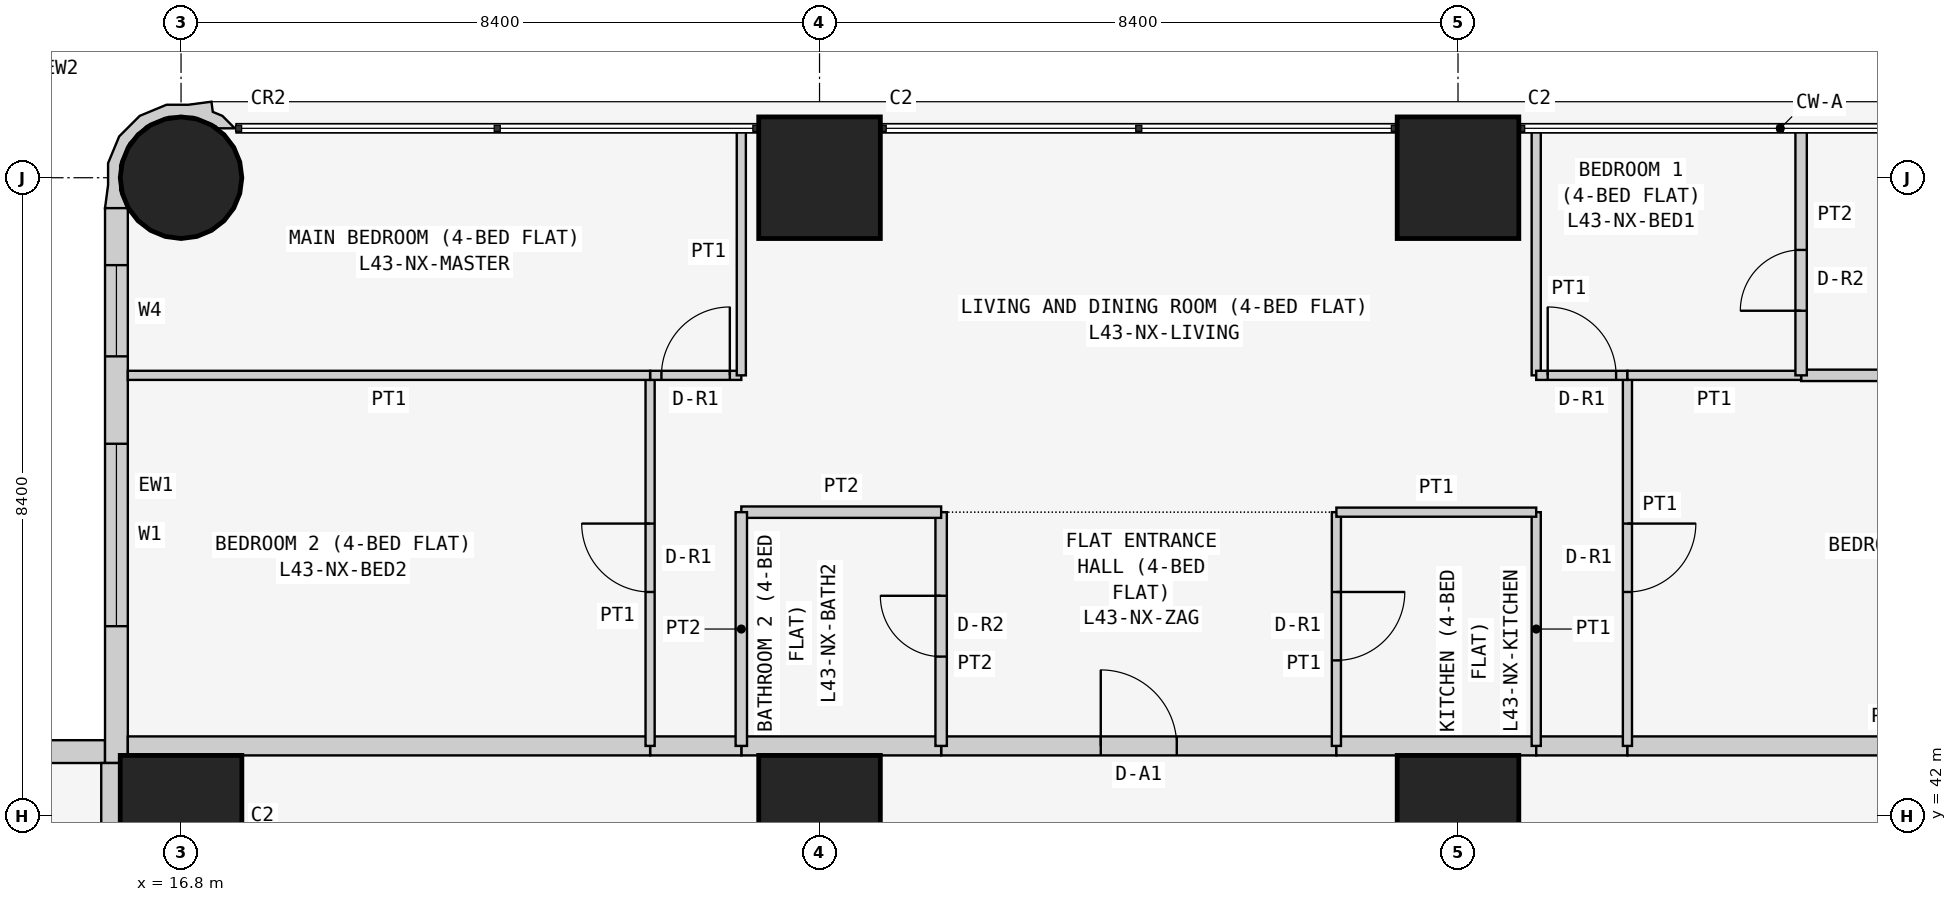
"""IFC4 building model, lengths in metres.
Left out: names, types, materials, properties, quantities, classifications, styles, units other than length and angle.
Written with IfcOpenShell. Run it as: python <this file> out.ifc"""

import sys

from ifc_helpers import new_model, si_unit, direction, frame, frame_2d, origin, origin_2d, place, context, subcontext, project, spatial, polyline, rectangle, circle, outline, extrude, element, fill, save


model = new_model("IFC4")
c1 = context("Model", 3, precision=1e-05, world=origin(), true_north=direction((0.0, 1.0)))
c2 = subcontext(c1, "Body", "Model", "MODEL_VIEW")
j1 = project(units=[si_unit("LENGTHUNIT", "METRE"), si_unit("PLANEANGLEUNIT", "RADIAN")], contexts=[c1])
p1 = place(None, origin())
s1 = spatial("IfcSite", under=j1, at=p1, CompositionType="ELEMENT")
p2 = place(p1, origin())
s2 = spatial("IfcBuilding", under=s1, at=p2, CompositionType="ELEMENT")
p3 = place(p2, frame((0.0, 0.0, 166.5)))
s3 = spatial("IfcBuildingStorey", under=s2, at=p3, CompositionType="ELEMENT", Elevation=166.5)
p4 = place(p3, frame((16.8, 42.0, 0.0), z_axis=(0.0, 0.0, 1.0), x_axis=(1.0, 0.0, 0.0)))
e1 = element("IfcColumn", 1, at=p4, inside=s3, PredefinedType="COLUMN", context=c2, shape_type="SweptSolid", body=[
    extrude(rectangle(XDim=1.6, YDim=1.6, at=origin_2d()), origin(), (0.0, 0.0, 1.0), 3.6),
])
p5 = place(p3, frame((16.8, 50.4, 0.0), z_axis=(0.0, 0.0, 1.0), x_axis=(1.0, 0.0, 0.0)))
e2 = element("IfcColumn", 2, at=p5, inside=s3, PredefinedType="COLUMN", context=c2, shape_type="SweptSolid", body=[
    extrude(circle(Radius=0.8, at=origin_2d()), origin(), (0.0, 0.0, 1.0), 3.6),
])
for number, where, z_axis, x_axis in (
    (3, (25.2, 42.0, 0.0), (0.0, 0.0, 1.0), (1.0, 0.0, 0.0)),
    (4, (25.2, 50.4, 0.0), (0.0, 0.0, 1.0), (1.0, 0.0, 0.0)),
    (5, (33.6, 42.0, 0.0), (0.0, 0.0, 1.0), (1.0, 0.0, 0.0)),
    (6, (33.6, 50.4, 0.0), (0.0, 0.0, 1.0), (1.0, 0.0, 0.0)),
):
    element("IfcColumn", number, at=place(p3, frame(where, z_axis=z_axis, x_axis=x_axis)), inside=s3, PredefinedType="COLUMN", context=c2, shape_type="SweptSolid", body=[
        extrude(rectangle(XDim=1.6, YDim=1.6, at=origin_2d()), origin(), (0.0, 0.0, 1.0), 3.6),
    ])
p6 = place(p3, frame((15.8, 42.85, 0.0), z_axis=(0.0, 0.0, 1.0), x_axis=(-1.0, 0.0, 0.0)))
e7 = element("IfcWall", 7, at=p6, inside=s3, PredefinedType="SOLIDWALL", context=c2, shape_type="SweptSolid", body=[
    extrude(rectangle(XDim=15.4, YDim=0.3, at=frame_2d((7.7, 0.0))), origin(), (0.0, 0.0, 1.0), 3.45),
])
p7 = place(p6, frame((1.2, 0.0, 0.9)))
e8 = element("IfcOpeningElement", 8, at=p7, cuts=e7, PredefinedType="OPENING", context=c2, shape_type="SweptSolid", body=[
    extrude(rectangle(XDim=1.8, YDim=1.5, at=frame_2d((0.9, 0.75))), frame((0.0, 0.16, 0.0), z_axis=(0.0, -1.0, 0.0), x_axis=(1.0, 0.0, 0.0)), (0.0, 0.0, 1.0), 0.32),
])
p8 = place(p6, frame((4.95, 0.0, 1.5)))
e9 = element("IfcOpeningElement", 9, at=p8, cuts=e7, PredefinedType="OPENING", context=c2, shape_type="SweptSolid", body=[
    extrude(rectangle(XDim=0.9, YDim=0.7, at=frame_2d((0.45, 0.35))), frame((0.0, 0.16, 0.0), z_axis=(0.0, -1.0, 0.0), x_axis=(1.0, 0.0, 0.0)), (0.0, 0.0, 1.0), 0.32),
])
p9 = place(p6, frame((8.5, 0.0, 0.9)))
e10 = element("IfcOpeningElement", 10, at=p9, cuts=e7, PredefinedType="OPENING", context=c2, shape_type="SweptSolid", body=[
    extrude(rectangle(XDim=1.8, YDim=1.5, at=frame_2d((0.9, 0.75))), frame((0.0, 0.16, 0.0), z_axis=(0.0, -1.0, 0.0), x_axis=(1.0, 0.0, 0.0)), (0.0, 0.0, 1.0), 0.32),
])
p10 = place(p6, frame((12.5, 0.0, 0.0)))
e11 = element("IfcOpeningElement", 11, at=p10, cuts=e7, PredefinedType="OPENING", context=c2, shape_type="SweptSolid", body=[
    extrude(rectangle(XDim=0.9, YDim=2.4, at=frame_2d((0.45, 1.2))), frame((0.0, 0.16, 0.0), z_axis=(0.0, -1.0, 0.0), x_axis=(1.0, 0.0, 0.0)), (0.0, 0.0, 1.0), 0.32),
])
p11 = place(p6, frame((13.5, 0.0, 0.9)))
e12 = element("IfcOpeningElement", 12, at=p11, cuts=e7, PredefinedType="OPENING", context=c2, shape_type="SweptSolid", body=[
    extrude(rectangle(XDim=1.2, YDim=1.5, at=frame_2d((0.6, 0.75))), frame((0.0, 0.16, 0.0), z_axis=(0.0, -1.0, 0.0), x_axis=(1.0, 0.0, 0.0)), (0.0, 0.0, 1.0), 0.32),
])
p12 = place(p3, frame((15.95, 50.0, 0.0), z_axis=(0.0, 0.0, 1.0), x_axis=(0.0, -1.0, 0.0)))
e13 = element("IfcWall", 13, at=p12, inside=s3, PredefinedType="SOLIDWALL", context=c2, shape_type="SweptSolid", body=[
    extrude(rectangle(XDim=7.3, YDim=0.3, at=frame_2d((3.65, 0.0))), origin(), (0.0, 0.0, 1.0), 3.45),
])
p13 = place(p12, frame((3.1, 0.0, 0.9)))
e14 = element("IfcOpeningElement", 14, at=p13, cuts=e13, PredefinedType="OPENING", context=c2, shape_type="SweptSolid", body=[
    extrude(rectangle(XDim=2.4, YDim=1.5, at=frame_2d((1.2, 0.75))), frame((0.0, 0.16, 0.0), z_axis=(0.0, -1.0, 0.0), x_axis=(1.0, 0.0, 0.0)), (0.0, 0.0, 1.0), 0.32),
])
p14 = place(p12, frame((0.75, 0.0, 0.9)))
e15 = element("IfcOpeningElement", 15, at=p14, cuts=e13, PredefinedType="OPENING", context=c2, shape_type="SweptSolid", body=[
    extrude(rectangle(XDim=1.2, YDim=1.5, at=frame_2d((0.6, 0.75))), frame((0.0, 0.16, 0.0), z_axis=(0.0, -1.0, 0.0), x_axis=(1.0, 0.0, 0.0)), (0.0, 0.0, 1.0), 0.32),
])
p15 = place(p3, frame((17.448, 50.995, 0.0), z_axis=(0.0, 0.0, 1.0), x_axis=(-0.343276641956, 0.93923434088, 0.0)))
e16 = element("IfcWall", 16, at=p15, inside=s3, PredefinedType="SOLIDWALL", context=c2, shape_type="SweptSolid", body=[
    extrude(outline(polyline([(0.241, 0.023), (0.333, 0.124), (0.465, 0.094), (0.532, 0.393), (0.631, 0.663), (0.614, 1.045), (0.454, 1.391), (0.172, 1.649), (-0.098, 1.748), (-0.369, 1.89), (-0.509, 1.621), (-0.491, 1.615), (-0.479, 1.609), (-0.211, 1.62), (0.088, 1.511), (0.323, 1.295), (0.457, 1.006), (0.47, 0.688), (0.361, 0.389), (0.145, 0.154), (0.108, 0.137), (0.031, -0.075), (0.241, 0.023)])), origin(), (0.0, 0.0, 1.0), 3.45),
])
p16 = place(p3, frame((26.8, 42.925, 0.0), z_axis=(0.0, 0.0, 1.0), x_axis=(1.0, 0.0, 0.0)))
e17 = element("IfcWall", 17, at=p16, inside=s3, PredefinedType="PARTITIONING", context=c2, shape_type="SweptSolid", body=[
    extrude(rectangle(XDim=5.2, YDim=0.25, at=frame_2d((2.6, 0.0))), origin(), (0.0, 0.0, 1.0), 3.45),
])
p17 = place(p16, frame((2.1, 0.0, 0.0)))
e18 = element("IfcOpeningElement", 18, at=p17, cuts=e17, PredefinedType="OPENING", context=c2, shape_type="SweptSolid", body=[
    extrude(rectangle(XDim=1.0, YDim=2.1, at=frame_2d((0.5, 1.05))), frame((0.0, 0.135, 0.0), z_axis=(0.0, -1.0, 0.0), x_axis=(1.0, 0.0, 0.0)), (0.0, 0.0, 1.0), 0.27),
])
p18 = place(p3, frame((24.171, 42.925, 0.0), z_axis=(0.0, 0.0, 1.0), x_axis=(1.0, 0.0, 0.0)))
e19 = element("IfcWall", 19, at=p18, inside=s3, PredefinedType="PARTITIONING", context=c2, shape_type="SweptSolid", body=[
    extrude(rectangle(XDim=2.629, YDim=0.25, at=frame_2d((1.314, 0.0))), origin(), (0.0, 0.0, 1.0), 3.45),
])
p19 = place(p3, frame((32.0, 42.925, 0.0), z_axis=(0.0, 0.0, 1.0), x_axis=(1.0, 0.0, 0.0)))
e20 = element("IfcWall", 20, at=p19, inside=s3, PredefinedType="PARTITIONING", context=c2, shape_type="SweptSolid", body=[
    extrude(rectangle(XDim=2.629, YDim=0.25, at=frame_2d((1.314, 0.0))), origin(), (0.0, 0.0, 1.0), 3.45),
])
p20 = place(p3, frame((22.971, 42.925, 0.0), z_axis=(0.0, 0.0, 1.0), x_axis=(1.0, 0.0, 0.0)))
e21 = element("IfcWall", 21, at=p20, inside=s3, PredefinedType="PARTITIONING", context=c2, shape_type="SweptSolid", body=[
    extrude(rectangle(XDim=1.2, YDim=0.25, at=frame_2d((0.6, 0.0))), origin(), (0.0, 0.0, 1.0), 3.45),
])
p21 = place(p3, frame((34.629, 42.925, 0.0), z_axis=(0.0, 0.0, 1.0), x_axis=(1.0, 0.0, 0.0)))
e22 = element("IfcWall", 22, at=p21, inside=s3, PredefinedType="PARTITIONING", context=c2, shape_type="SweptSolid", body=[
    extrude(rectangle(XDim=1.2, YDim=0.25, at=frame_2d((0.6, 0.0))), origin(), (0.0, 0.0, 1.0), 3.45),
])
for number, where, z_axis, x_axis in (
    (23, (16.1, 42.925, 0.0), (0.0, 0.0, 1.0), (1.0, 0.0, 0.0)),
    (24, (35.829, 42.925, 0.0), (0.0, 0.0, 1.0), (1.0, 0.0, 0.0)),
    (25, (15.875, 35.829, 0.0), (0.0, 0.0, 1.0), (0.0, 1.0, 0.0)),
):
    element("IfcWall", number, at=place(p3, frame(where, z_axis=z_axis, x_axis=x_axis)), inside=s3, PredefinedType="PARTITIONING", context=c2, shape_type="SweptSolid", body=[
        extrude(rectangle(XDim=6.871, YDim=0.25, at=frame_2d((3.436, 0.0))), origin(), (0.0, 0.0, 1.0), 3.45),
    ])
p22 = place(p3, frame((26.8, 46.0, 0.0), z_axis=(0.0, 0.0, 1.0), x_axis=(0.0, -1.0, 0.0)))
e26 = element("IfcWall", 26, at=p22, inside=s3, PredefinedType="PARTITIONING", context=c2, shape_type="SweptSolid", body=[
    extrude(rectangle(XDim=3.075, YDim=0.15, at=frame_2d((1.538, 0.0))), origin(), (0.0, 0.0, 1.0), 3.45),
])
p23 = place(p22, frame((1.1, 0.0, 0.0)))
e27 = element("IfcOpeningElement", 27, at=p23, cuts=e26, PredefinedType="OPENING", context=c2, shape_type="SweptSolid", body=[
    extrude(rectangle(XDim=0.8, YDim=2.1, at=frame_2d((0.4, 1.05))), frame((0.0, 0.085, 0.0), z_axis=(0.0, -1.0, 0.0), x_axis=(1.0, 0.0, 0.0)), (0.0, 0.0, 1.0), 0.17),
])
p24 = place(p3, frame((32.0, 42.925, 0.0), z_axis=(0.0, 0.0, 1.0), x_axis=(0.0, 1.0, 0.0)))
e28 = element("IfcWall", 28, at=p24, inside=s3, PredefinedType="PARTITIONING", context=c2, shape_type="SweptSolid", body=[
    extrude(rectangle(XDim=3.075, YDim=0.12, at=frame_2d((1.538, 0.0))), origin(), (0.0, 0.0, 1.0), 3.45),
])
p25 = place(p24, frame((1.125, 0.0, 0.0)))
e29 = element("IfcOpeningElement", 29, at=p25, cuts=e28, PredefinedType="OPENING", context=c2, shape_type="SweptSolid", body=[
    extrude(rectangle(XDim=0.9, YDim=2.1, at=frame_2d((0.45, 1.05))), frame((0.0, 0.07, 0.0), z_axis=(0.0, -1.0, 0.0), x_axis=(1.0, 0.0, 0.0)), (0.0, 0.0, 1.0), 0.14),
])
p26 = place(p3, frame((26.8, 46.0, 0.0), z_axis=(0.0, 0.0, 1.0), x_axis=(-1.0, 0.0, 0.0)))
e30 = element("IfcWall", 30, at=p26, inside=s3, PredefinedType="PARTITIONING", context=c2, shape_type="SweptSolid", body=[
    extrude(rectangle(XDim=2.629, YDim=0.15, at=frame_2d((1.314, 0.0))), origin(), (0.0, 0.0, 1.0), 3.45),
])
p27 = place(p3, frame((24.171, 46.0, 0.0), z_axis=(0.0, 0.0, 1.0), x_axis=(0.0, -1.0, 0.0)))
e31 = element("IfcWall", 31, at=p27, inside=s3, PredefinedType="PARTITIONING", context=c2, shape_type="SweptSolid", body=[
    extrude(rectangle(XDim=3.075, YDim=0.15, at=frame_2d((1.538, 0.0))), origin(), (0.0, 0.0, 1.0), 3.45),
])
p28 = place(p3, frame((34.629, 42.925, 0.0), z_axis=(0.0, 0.0, 1.0), x_axis=(0.0, 1.0, 0.0)))
e32 = element("IfcWall", 32, at=p28, inside=s3, PredefinedType="PARTITIONING", context=c2, shape_type="SweptSolid", body=[
    extrude(rectangle(XDim=3.075, YDim=0.12, at=frame_2d((1.538, 0.0))), origin(), (0.0, 0.0, 1.0), 3.45),
])
p29 = place(p3, frame((34.629, 46.0, 0.0), z_axis=(0.0, 0.0, 1.0), x_axis=(-1.0, 0.0, 0.0)))
e33 = element("IfcWall", 33, at=p29, inside=s3, PredefinedType="PARTITIONING", context=c2, shape_type="SweptSolid", body=[
    extrude(rectangle(XDim=2.629, YDim=0.12, at=frame_2d((1.314, 0.0))), origin(), (0.0, 0.0, 1.0), 3.45),
])
p30 = place(p3, frame((22.971, 42.925, 0.0), z_axis=(0.0, 0.0, 1.0), x_axis=(0.0, 1.0, 0.0)))
e34 = element("IfcWall", 34, at=p30, inside=s3, PredefinedType="PARTITIONING", context=c2, shape_type="SweptSolid", body=[
    extrude(rectangle(XDim=4.875, YDim=0.12, at=frame_2d((2.438, 0.0))), origin(), (0.0, 0.0, 1.0), 3.45),
])
p31 = place(p30, frame((2.025, 0.0, 0.0)))
e35 = element("IfcOpeningElement", 35, at=p31, cuts=e34, PredefinedType="OPENING", context=c2, shape_type="SweptSolid", body=[
    extrude(rectangle(XDim=0.9, YDim=2.1, at=frame_2d((0.45, 1.05))), frame((0.0, 0.07, 0.0), z_axis=(0.0, -1.0, 0.0), x_axis=(1.0, 0.0, 0.0)), (0.0, 0.0, 1.0), 0.14),
])
p32 = place(p3, frame((22.971, 47.8, 0.0), z_axis=(0.0, 0.0, 1.0), x_axis=(1.0, 0.0, 0.0)))
e36 = element("IfcWall", 36, at=p32, inside=s3, PredefinedType="PARTITIONING", context=c2, shape_type="SweptSolid", body=[
    extrude(rectangle(XDim=1.2, YDim=0.12, at=frame_2d((0.6, 0.0))), origin(), (0.0, 0.0, 1.0), 3.45),
])
p33 = place(p32, frame((0.149, 0.0, 0.0)))
e37 = element("IfcOpeningElement", 37, at=p33, cuts=e36, PredefinedType="OPENING", context=c2, shape_type="SweptSolid", body=[
    extrude(rectangle(XDim=0.9, YDim=2.1, at=frame_2d((0.45, 1.05))), frame((0.0, 0.07, 0.0), z_axis=(0.0, -1.0, 0.0), x_axis=(1.0, 0.0, 0.0)), (0.0, 0.0, 1.0), 0.14),
])
p34 = place(p3, frame((24.171, 47.8, 0.0), z_axis=(0.0, 0.0, 1.0), x_axis=(0.0, 1.0, 0.0)))
e38 = element("IfcWall", 38, at=p34, inside=s3, PredefinedType="PARTITIONING", context=c2, shape_type="SweptSolid", body=[
    extrude(rectangle(XDim=3.25, YDim=0.12, at=frame_2d((1.625, 0.0))), origin(), (0.0, 0.0, 1.0), 3.45),
])
p35 = place(p3, frame((35.829, 47.8, 0.0), z_axis=(0.0, 0.0, 1.0), x_axis=(0.0, -1.0, 0.0)))
e39 = element("IfcWall", 39, at=p35, inside=s3, PredefinedType="PARTITIONING", context=c2, shape_type="SweptSolid", body=[
    extrude(rectangle(XDim=4.875, YDim=0.12, at=frame_2d((2.438, 0.0))), origin(), (0.0, 0.0, 1.0), 3.45),
])
p36 = place(p35, frame((1.95, 0.0, 0.0)))
e40 = element("IfcOpeningElement", 40, at=p36, cuts=e39, PredefinedType="OPENING", context=c2, shape_type="SweptSolid", body=[
    extrude(rectangle(XDim=0.9, YDim=2.1, at=frame_2d((0.45, 1.05))), frame((0.0, 0.07, 0.0), z_axis=(0.0, -1.0, 0.0), x_axis=(1.0, 0.0, 0.0)), (0.0, 0.0, 1.0), 0.14),
])
p37 = place(p3, frame((34.629, 51.05, 0.0), z_axis=(0.0, 0.0, 1.0), x_axis=(0.0, -1.0, 0.0)))
e41 = element("IfcWall", 41, at=p37, inside=s3, PredefinedType="PARTITIONING", context=c2, shape_type="SweptSolid", body=[
    extrude(rectangle(XDim=3.25, YDim=0.12, at=frame_2d((1.625, 0.0))), origin(), (0.0, 0.0, 1.0), 3.45),
])
p38 = place(p3, frame((34.629, 47.8, 0.0), z_axis=(0.0, 0.0, 1.0), x_axis=(1.0, 0.0, 0.0)))
e42 = element("IfcWall", 42, at=p38, inside=s3, PredefinedType="PARTITIONING", context=c2, shape_type="SweptSolid", body=[
    extrude(rectangle(XDim=1.2, YDim=0.12, at=frame_2d((0.6, 0.0))), origin(), (0.0, 0.0, 1.0), 3.45),
])
p39 = place(p38, frame((0.151, 0.0, 0.0)))
e43 = element("IfcOpeningElement", 43, at=p39, cuts=e42, PredefinedType="OPENING", context=c2, shape_type="SweptSolid", body=[
    extrude(rectangle(XDim=0.9, YDim=2.1, at=frame_2d((0.45, 1.05))), frame((0.0, 0.07, 0.0), z_axis=(0.0, -1.0, 0.0), x_axis=(1.0, 0.0, 0.0)), (0.0, 0.0, 1.0), 0.14),
])
p40 = place(p3, frame((22.971, 47.8, 0.0), z_axis=(0.0, 0.0, 1.0), x_axis=(-1.0, 0.0, 0.0)))
e44 = element("IfcWall", 44, at=p40, inside=s3, PredefinedType="PARTITIONING", context=c2, shape_type="SweptSolid", body=[
    extrude(rectangle(XDim=6.871, YDim=0.12, at=frame_2d((3.436, 0.0))), origin(), (0.0, 0.0, 1.0), 3.45),
])
p41 = place(p3, frame((42.7, 47.8, 0.0), z_axis=(0.0, 0.0, 1.0), x_axis=(-1.0, 0.0, 0.0)))
e45 = element("IfcWall", 45, at=p41, inside=s3, PredefinedType="PARTITIONING", context=c2, shape_type="SweptSolid", body=[
    extrude(rectangle(XDim=4.586, YDim=0.15, at=frame_2d((2.293, 0.0))), origin(), (0.0, 0.0, 1.0), 3.45),
])
p42 = place(p3, frame((38.114, 47.8, 0.0), z_axis=(0.0, 0.0, 1.0), x_axis=(-1.0, 0.0, 0.0)))
e46 = element("IfcWall", 46, at=p42, inside=s3, PredefinedType="PARTITIONING", context=c2, shape_type="SweptSolid", body=[
    extrude(rectangle(XDim=2.285, YDim=0.12, at=frame_2d((1.143, 0.0))), origin(), (0.0, 0.0, 1.0), 3.45),
])
p43 = place(p3, frame((38.114, 51.05, 0.0), z_axis=(0.0, 0.0, 1.0), x_axis=(0.0, -1.0, 0.0)))
e47 = element("IfcWall", 47, at=p43, inside=s3, PredefinedType="PARTITIONING", context=c2, shape_type="SweptSolid", body=[
    extrude(rectangle(XDim=3.25, YDim=0.15, at=frame_2d((1.625, 0.0))), origin(), (0.0, 0.0, 1.0), 3.45),
])
p44 = place(p43, frame((1.6, 0.0, 0.0)))
e48 = element("IfcOpeningElement", 48, at=p44, cuts=e47, PredefinedType="OPENING", context=c2, shape_type="SweptSolid", body=[
    extrude(rectangle(XDim=0.8, YDim=2.1, at=frame_2d((0.4, 1.05))), frame((0.0, 0.085, 0.0), z_axis=(0.0, -1.0, 0.0), x_axis=(1.0, 0.0, 0.0)), (0.0, 0.0, 1.0), 0.17),
])
p45 = place(p13, origin())
e49 = element("IfcWindow", 49, at=p45, inside=s3, PartitioningType="SINGLE_PANEL", PredefinedType="WINDOW", context=c2, shape_type="SweptSolid", body=[
    extrude(rectangle(XDim=2.4, YDim=1.5, at=frame_2d((1.2, 0.75))), frame((0.0, 0.03, 0.0), z_axis=(0.0, -1.0, 0.0), x_axis=(1.0, 0.0, 0.0)), (0.0, 0.0, 1.0), 0.06),
])
fill(e14, e49)
p46 = place(p14, origin())
e50 = element("IfcWindow", 50, at=p46, inside=s3, PartitioningType="SINGLE_PANEL", PredefinedType="WINDOW", context=c2, shape_type="SweptSolid", body=[
    extrude(rectangle(XDim=1.2, YDim=1.5, at=frame_2d((0.6, 0.75))), frame((0.0, 0.03, 0.0), z_axis=(0.0, -1.0, 0.0), x_axis=(1.0, 0.0, 0.0)), (0.0, 0.0, 1.0), 0.06),
])
fill(e15, e50)
p47 = place(p17, origin())
e51 = element("IfcDoor", 51, at=p47, inside=s3, OperationType="SINGLE_SWING_LEFT", PredefinedType="DOOR", context=c2, shape_type="SweptSolid", body=[
    extrude(rectangle(XDim=1.0, YDim=2.1, at=frame_2d((0.5, 1.05))), frame((0.0, 0.025, 0.0), z_axis=(0.0, -1.0, 0.0), x_axis=(1.0, 0.0, 0.0)), (0.0, 0.0, 1.0), 0.05),
])
fill(e18, e51)
p48 = place(p23, frame((0.8, 0.0, 0.0), z_axis=(0.0, 0.0, 1.0), x_axis=(-1.0, 0.0, 0.0)))
e52 = element("IfcDoor", 52, at=p48, inside=s3, OperationType="SINGLE_SWING_RIGHT", PredefinedType="DOOR", context=c2, shape_type="SweptSolid", body=[
    extrude(rectangle(XDim=0.8, YDim=2.1, at=frame_2d((0.4, 1.05))), frame((0.0, 0.025, 0.0), z_axis=(0.0, -1.0, 0.0), x_axis=(1.0, 0.0, 0.0)), (0.0, 0.0, 1.0), 0.05),
])
fill(e27, e52)
p49 = place(p25, frame((0.9, 0.0, 0.0), z_axis=(0.0, 0.0, 1.0), x_axis=(-1.0, 0.0, 0.0)))
e53 = element("IfcDoor", 53, at=p49, inside=s3, OperationType="SINGLE_SWING_LEFT", PredefinedType="DOOR", context=c2, shape_type="SweptSolid", body=[
    extrude(rectangle(XDim=0.9, YDim=2.1, at=frame_2d((0.45, 1.05))), frame((0.0, 0.025, 0.0), z_axis=(0.0, -1.0, 0.0), x_axis=(1.0, 0.0, 0.0)), (0.0, 0.0, 1.0), 0.05),
])
fill(e29, e53)
p50 = place(p31, origin())
e54 = element("IfcDoor", 54, at=p50, inside=s3, OperationType="SINGLE_SWING_RIGHT", PredefinedType="DOOR", context=c2, shape_type="SweptSolid", body=[
    extrude(rectangle(XDim=0.9, YDim=2.1, at=frame_2d((0.45, 1.05))), frame((0.0, 0.025, 0.0), z_axis=(0.0, -1.0, 0.0), x_axis=(1.0, 0.0, 0.0)), (0.0, 0.0, 1.0), 0.05),
])
fill(e35, e54)
p51 = place(p33, origin())
e55 = element("IfcDoor", 55, at=p51, inside=s3, OperationType="SINGLE_SWING_RIGHT", PredefinedType="DOOR", context=c2, shape_type="SweptSolid", body=[
    extrude(rectangle(XDim=0.9, YDim=2.1, at=frame_2d((0.45, 1.05))), frame((0.0, 0.025, 0.0), z_axis=(0.0, -1.0, 0.0), x_axis=(1.0, 0.0, 0.0)), (0.0, 0.0, 1.0), 0.05),
])
fill(e37, e55)
p52 = place(p36, origin())
e56 = element("IfcDoor", 56, at=p52, inside=s3, OperationType="SINGLE_SWING_LEFT", PredefinedType="DOOR", context=c2, shape_type="SweptSolid", body=[
    extrude(rectangle(XDim=0.9, YDim=2.1, at=frame_2d((0.45, 1.05))), frame((0.0, 0.025, 0.0), z_axis=(0.0, -1.0, 0.0), x_axis=(1.0, 0.0, 0.0)), (0.0, 0.0, 1.0), 0.05),
])
fill(e40, e56)
p53 = place(p39, origin())
e57 = element("IfcDoor", 57, at=p53, inside=s3, OperationType="SINGLE_SWING_LEFT", PredefinedType="DOOR", context=c2, shape_type="SweptSolid", body=[
    extrude(rectangle(XDim=0.9, YDim=2.1, at=frame_2d((0.45, 1.05))), frame((0.0, 0.025, 0.0), z_axis=(0.0, -1.0, 0.0), x_axis=(1.0, 0.0, 0.0)), (0.0, 0.0, 1.0), 0.05),
])
fill(e43, e57)
p54 = place(p44, frame((0.8, 0.0, 0.0), z_axis=(0.0, 0.0, 1.0), x_axis=(-1.0, 0.0, 0.0)))
e58 = element("IfcDoor", 58, at=p54, inside=s3, OperationType="SINGLE_SWING_LEFT", PredefinedType="DOOR", context=c2, shape_type="SweptSolid", body=[
    extrude(rectangle(XDim=0.8, YDim=2.1, at=frame_2d((0.4, 1.05))), frame((0.0, 0.025, 0.0), z_axis=(0.0, -1.0, 0.0), x_axis=(1.0, 0.0, 0.0)), (0.0, 0.0, 1.0), 0.05),
])
fill(e48, e58)
save(model, sys.argv[1])
